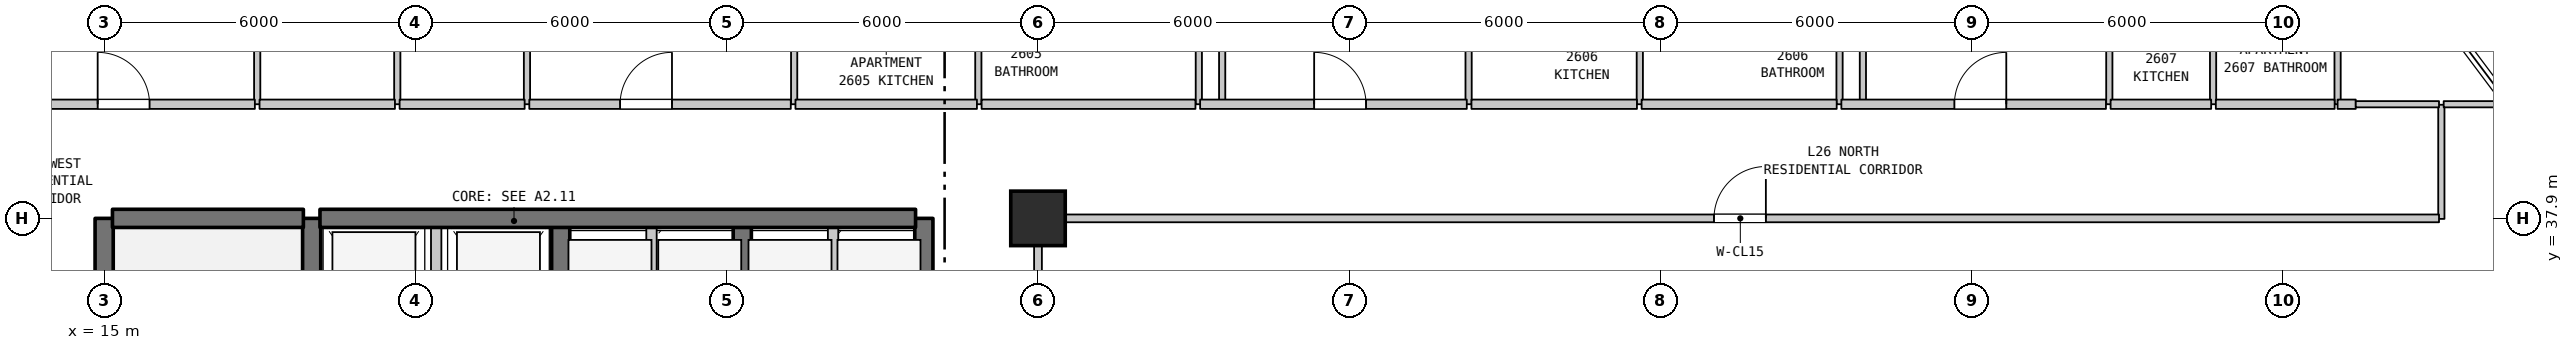
"""IFC4 building model, lengths in metres.
Left out: names, types, materials, properties, quantities, classifications, styles, units other than length and angle.
Written with IfcOpenShell. Run it as: python <this file> out.ifc"""

import sys

from ifc_helpers import new_model, si_unit, direction, frame, frame_2d, origin, origin_2d, place, context, subcontext, project, spatial, rectangle, extrude, element, fill, save


model = new_model("IFC4")
c1 = context("Model", 3, precision=1e-05, world=origin(), true_north=direction((0.0, 1.0)))
c2 = subcontext(c1, "Body", "Model", "MODEL_VIEW")
j1 = project(units=[si_unit("LENGTHUNIT", "METRE"), si_unit("PLANEANGLEUNIT", "RADIAN")], contexts=[c1])
p1 = place(None, origin())
s1 = spatial("IfcSite", under=j1, at=p1, CompositionType="ELEMENT")
p2 = place(p1, origin())
s2 = spatial("IfcBuilding", under=s1, at=p2, CompositionType="ELEMENT")
p3 = place(p2, frame((0.0, 0.0, 109.4)))
s3 = spatial("IfcBuildingStorey", under=s2, at=p3, CompositionType="ELEMENT", Elevation=109.4)
p4 = place(p3, frame((33.0, 37.9, 0.0), z_axis=(0.0, 0.0, 1.0), x_axis=(1.0, 0.0, 0.0)))
e1 = element("IfcColumn", 1, at=p4, inside=s3, PredefinedType="COLUMN", context=c2, shape_type="SweptSolid", body=[
    extrude(rectangle(XDim=1.05, YDim=1.05, at=origin_2d()), origin(), (0.0, 0.0, 1.0), 3.7),
])
p5 = place(p3, frame((15.0, 31.1, 0.0), z_axis=(0.0, 0.0, 1.0), x_axis=(0.0, 1.0, 0.0)))
e2 = element("IfcWall", 2, at=p5, inside=s3, PredefinedType="SHEAR", context=c2, shape_type="SweptSolid", body=[
    extrude(rectangle(XDim=6.8, YDim=0.35, at=frame_2d((3.4, 0.0))), origin(), (0.0, 0.0, 1.0), 3.385),
])
p6 = place(p3, frame((17.95, 40.1, 0.0), z_axis=(0.0, 0.0, 1.0), x_axis=(0.0, 1.0, 0.0)))
e3 = element("IfcWall", 3, at=p6, inside=s3, PredefinedType="PARTITIONING", context=c2, shape_type="SweptSolid", body=[
    extrude(rectangle(XDim=3.2, YDim=0.12, at=frame_2d((1.6, 0.0))), origin(), (0.0, 0.0, 1.0), 3.385),
])
p7 = place(p3, frame((19.0, 35.0, 0.0), z_axis=(0.0, 0.0, 1.0), x_axis=(0.0, 1.0, 0.0)))
e4 = element("IfcWall", 4, at=p7, inside=s3, PredefinedType="SHEAR", context=c2, shape_type="SweptSolid", body=[
    extrude(rectangle(XDim=2.9, YDim=0.35, at=frame_2d((1.45, 0.0))), origin(), (0.0, 0.0, 1.0), 3.385),
])
p8 = place(p3, frame((20.65, 40.1, 0.0), z_axis=(0.0, 0.0, 1.0), x_axis=(0.0, 1.0, 0.0)))
e5 = element("IfcWall", 5, at=p8, inside=s3, PredefinedType="PARTITIONING", context=c2, shape_type="SweptSolid", body=[
    extrude(rectangle(XDim=3.2, YDim=0.12, at=frame_2d((1.6, 0.0))), origin(), (0.0, 0.0, 1.0), 3.385),
])
p9 = place(p8, frame((1.15, 0.0, 0.0)))
e6 = element("IfcOpeningElement", 6, at=p9, cuts=e5, PredefinedType="OPENING", context=c2, shape_type="SweptSolid", body=[
    extrude(rectangle(XDim=0.9, YDim=2.15, at=frame_2d((0.45, 1.075))), frame((0.0, 0.07, 0.0), z_axis=(0.0, -1.0, 0.0), x_axis=(1.0, 0.0, 0.0)), (0.0, 0.0, 1.0), 0.14),
])
p10 = place(p3, frame((21.4, 35.0, 0.0), z_axis=(0.0, 0.0, 1.0), x_axis=(0.0, 1.0, 0.0)))
e7 = element("IfcWall", 7, at=p10, inside=s3, PredefinedType="STANDARD", context=c2, shape_type="SweptSolid", body=[
    extrude(rectangle(XDim=2.9, YDim=0.2, at=frame_2d((1.45, 0.0))), origin(), (0.0, 0.0, 1.0), 3.385),
])
p11 = place(p3, frame((23.15, 40.1, 0.0), z_axis=(0.0, 0.0, 1.0), x_axis=(0.0, 1.0, 0.0)))
e8 = element("IfcWall", 8, at=p11, inside=s3, PredefinedType="PARTITIONING", context=c2, shape_type="SweptSolid", body=[
    extrude(rectangle(XDim=2.05, YDim=0.12, at=frame_2d((1.025, 0.0))), origin(), (0.0, 0.0, 1.0), 3.385),
])
p12 = place(p3, frame((23.8, 35.0, 0.0), z_axis=(0.0, 0.0, 1.0), x_axis=(0.0, 1.0, 0.0)))
e9 = element("IfcWall", 9, at=p12, inside=s3, PredefinedType="SHEAR", context=c2, shape_type="SweptSolid", body=[
    extrude(rectangle(XDim=2.9, YDim=0.35, at=frame_2d((1.45, 0.0))), origin(), (0.0, 0.0, 1.0), 3.385),
])
p13 = place(p3, frame((25.55, 35.0, 0.0), z_axis=(0.0, 0.0, 1.0), x_axis=(0.0, 1.0, 0.0)))
e10 = element("IfcWall", 10, at=p13, inside=s3, PredefinedType="STANDARD", context=c2, shape_type="SweptSolid", body=[
    extrude(rectangle(XDim=2.9, YDim=0.2, at=frame_2d((1.45, 0.0))), origin(), (0.0, 0.0, 1.0), 3.385),
])
p14 = place(p3, frame((27.3, 35.0, 0.0), z_axis=(0.0, 0.0, 1.0), x_axis=(0.0, 1.0, 0.0)))
e11 = element("IfcWall", 11, at=p14, inside=s3, PredefinedType="SHEAR", context=c2, shape_type="SweptSolid", body=[
    extrude(rectangle(XDim=2.9, YDim=0.35, at=frame_2d((1.45, 0.0))), origin(), (0.0, 0.0, 1.0), 3.385),
])
p15 = place(p3, frame((28.3, 40.1, 0.0), z_axis=(0.0, 0.0, 1.0), x_axis=(0.0, 1.0, 0.0)))
e12 = element("IfcWall", 12, at=p15, inside=s3, PredefinedType="PARTITIONING", context=c2, shape_type="SweptSolid", body=[
    extrude(rectangle(XDim=2.3, YDim=0.12, at=frame_2d((1.15, 0.0))), origin(), (0.0, 0.0, 1.0), 3.385),
])
p16 = place(p3, frame((29.05, 35.0, 0.0), z_axis=(0.0, 0.0, 1.0), x_axis=(0.0, 1.0, 0.0)))
e13 = element("IfcWall", 13, at=p16, inside=s3, PredefinedType="STANDARD", context=c2, shape_type="SweptSolid", body=[
    extrude(rectangle(XDim=2.9, YDim=0.2, at=frame_2d((1.45, 0.0))), origin(), (0.0, 0.0, 1.0), 3.385),
])
p17 = place(p3, frame((30.8, 35.0, 0.0), z_axis=(0.0, 0.0, 1.0), x_axis=(0.0, 1.0, 0.0)))
e14 = element("IfcWall", 14, at=p17, inside=s3, PredefinedType="SHEAR", context=c2, shape_type="SweptSolid", body=[
    extrude(rectangle(XDim=2.9, YDim=0.35, at=frame_2d((1.45, 0.0))), origin(), (0.0, 0.0, 1.0), 3.385),
])
p18 = place(p3, frame((31.85, 40.1, 0.0), z_axis=(0.0, 0.0, 1.0), x_axis=(0.0, 1.0, 0.0)))
e15 = element("IfcWall", 15, at=p18, inside=s3, PredefinedType="PARTITIONING", context=c2, shape_type="SweptSolid", body=[
    extrude(rectangle(XDim=2.3, YDim=0.12, at=frame_2d((1.15, 0.0))), origin(), (0.0, 0.0, 1.0), 3.385),
])
p19 = place(p3, frame((33.0, 27.91, 0.0), z_axis=(0.0, 0.0, 1.0), x_axis=(0.0, 1.0, 0.0)))
e16 = element("IfcWall", 16, at=p19, inside=s3, PredefinedType="STANDARD", context=c2, shape_type="SweptSolid", body=[
    extrude(rectangle(XDim=9.98, YDim=0.15, at=frame_2d((4.99, 0.0))), origin(), (0.0, 0.0, 1.0), 2.885),
])
p20 = place(p3, frame((36.1, 40.1, 0.0), z_axis=(0.0, 0.0, 1.0), x_axis=(0.0, 1.0, 0.0)))
e17 = element("IfcWall", 17, at=p20, inside=s3, PredefinedType="PARTITIONING", context=c2, shape_type="SweptSolid", body=[
    extrude(rectangle(XDim=2.3, YDim=0.12, at=frame_2d((1.15, 0.0))), origin(), (0.0, 0.0, 1.0), 3.385),
])
p21 = place(p3, frame((36.55, 40.1, 0.0), z_axis=(0.0, 0.0, 1.0), x_axis=(0.0, 1.0, 0.0)))
e18 = element("IfcWall", 18, at=p21, inside=s3, PredefinedType="PARTITIONING", context=c2, shape_type="SweptSolid", body=[
    extrude(rectangle(XDim=13.79, YDim=0.12, at=frame_2d((6.895, 0.0))), origin(), (0.0, 0.0, 1.0), 3.385),
])
for number, where, z_axis, x_axis in (
    (19, (41.3, 40.1, 0.0), (0.0, 0.0, 1.0), (0.0, 1.0, 0.0)),
    (20, (44.6, 40.1, 0.0), (0.0, 0.0, 1.0), (0.0, 1.0, 0.0)),
    (21, (48.45, 40.1, 0.0), (0.0, 0.0, 1.0), (0.0, 1.0, 0.0)),
):
    element("IfcWall", number, at=place(p3, frame(where, z_axis=z_axis, x_axis=x_axis)), inside=s3, PredefinedType="PARTITIONING", context=c2, shape_type="SweptSolid", body=[
        extrude(rectangle(XDim=2.3, YDim=0.12, at=frame_2d((1.15, 0.0))), origin(), (0.0, 0.0, 1.0), 3.385),
    ])
p22 = place(p3, frame((48.9, 40.1, 0.0), z_axis=(0.0, 0.0, 1.0), x_axis=(0.0, 1.0, 0.0)))
e22 = element("IfcWall", 22, at=p22, inside=s3, PredefinedType="PARTITIONING", context=c2, shape_type="SweptSolid", body=[
    extrude(rectangle(XDim=13.79, YDim=0.12, at=frame_2d((6.895, 0.0))), origin(), (0.0, 0.0, 1.0), 3.385),
])
for number, where, z_axis, x_axis in (
    (23, (53.65, 40.1, 0.0), (0.0, 0.0, 1.0), (0.0, 1.0, 0.0)),
    (24, (55.65, 40.1, 0.0), (0.0, 0.0, 1.0), (0.0, 1.0, 0.0)),
    (25, (58.05, 40.1, 0.0), (0.0, 0.0, 1.0), (0.0, 1.0, 0.0)),
):
    element("IfcWall", number, at=place(p3, frame(where, z_axis=z_axis, x_axis=x_axis)), inside=s3, PredefinedType="PARTITIONING", context=c2, shape_type="SweptSolid", body=[
        extrude(rectangle(XDim=2.3, YDim=0.12, at=frame_2d((1.15, 0.0))), origin(), (0.0, 0.0, 1.0), 3.385),
    ])
p23 = place(p3, frame((60.05, 37.89, 0.0), z_axis=(0.0, 0.0, 1.0), x_axis=(0.0, 1.0, 0.0)))
e26 = element("IfcWall", 26, at=p23, inside=s3, PredefinedType="PARTITIONING", context=c2, shape_type="SweptSolid", body=[
    extrude(rectangle(XDim=2.2, YDim=0.12, at=frame_2d((1.1, 0.0))), origin(), (0.0, 0.0, 1.0), 3.385),
])
p24 = place(p3, frame((15.16, 37.9, 0.0), z_axis=(0.0, 0.0, 1.0), x_axis=(1.0, 0.0, 0.0)))
e27 = element("IfcWall", 27, at=p24, inside=s3, PredefinedType="SHEAR", context=c2, shape_type="SweptSolid", body=[
    extrude(rectangle(XDim=3.68, YDim=0.35, at=frame_2d((1.84, 0.0))), origin(), (0.0, 0.0, 1.0), 3.385),
])
p25 = place(p3, frame((19.16, 37.9, 0.0), z_axis=(0.0, 0.0, 1.0), x_axis=(1.0, 0.0, 0.0)))
e28 = element("IfcWall", 28, at=p25, inside=s3, PredefinedType="SHEAR", context=c2, shape_type="SweptSolid", body=[
    extrude(rectangle(XDim=11.48, YDim=0.35, at=frame_2d((5.74, 0.0))), origin(), (0.0, 0.0, 1.0), 3.385),
])
p26 = place(p3, frame((33.07, 37.9, 0.0), z_axis=(0.0, 0.0, 1.0), x_axis=(1.0, 0.0, 0.0)))
e29 = element("IfcWall", 29, at=p26, inside=s3, PredefinedType="STANDARD", context=c2, shape_type="SweptSolid", body=[
    extrude(rectangle(XDim=26.935, YDim=0.15, at=frame_2d((13.467, 0.0))), origin(), (0.0, 0.0, 1.0), 3.385),
])
p27 = place(p26, frame((12.96, 0.0, 0.0)))
e30 = element("IfcOpeningElement", 30, at=p27, cuts=e29, PredefinedType="OPENING", context=c2, shape_type="SweptSolid", body=[
    extrude(rectangle(XDim=1.0, YDim=2.15, at=frame_2d((0.5, 1.075))), frame((0.0, 0.085, 0.0), z_axis=(0.0, -1.0, 0.0), x_axis=(1.0, 0.0, 0.0)), (0.0, 0.0, 1.0), 0.17),
])
p28 = place(p3, frame((12.875, 40.1, 0.0), z_axis=(0.0, 0.0, 1.0), x_axis=(1.0, 0.0, 0.0)))
e31 = element("IfcWall", 31, at=p28, inside=s3, PredefinedType="STANDARD", context=c2, shape_type="SweptSolid", body=[
    extrude(rectangle(XDim=5.03, YDim=0.18, at=frame_2d((2.515, 0.0))), origin(), (0.0, 0.0, 1.0), 3.385),
])
p29 = place(p28, frame((2.0, 0.0, 0.0)))
e32 = element("IfcOpeningElement", 32, at=p29, cuts=e31, PredefinedType="OPENING", context=c2, shape_type="SweptSolid", body=[
    extrude(rectangle(XDim=1.0, YDim=2.15, at=frame_2d((0.5, 1.075))), frame((0.0, 0.1, 0.0), z_axis=(0.0, -1.0, 0.0), x_axis=(1.0, 0.0, 0.0)), (0.0, 0.0, 1.0), 0.2),
])
p30 = place(p3, frame((17.995, 40.1, 0.0), z_axis=(0.0, 0.0, 1.0), x_axis=(1.0, 0.0, 0.0)))
e33 = element("IfcWall", 33, at=p30, inside=s3, PredefinedType="STANDARD", context=c2, shape_type="SweptSolid", body=[
    extrude(rectangle(XDim=2.61, YDim=0.18, at=frame_2d((1.305, 0.0))), origin(), (0.0, 0.0, 1.0), 3.385),
])
p31 = place(p3, frame((20.695, 40.1, 0.0), z_axis=(0.0, 0.0, 1.0), x_axis=(1.0, 0.0, 0.0)))
e34 = element("IfcWall", 34, at=p31, inside=s3, PredefinedType="STANDARD", context=c2, shape_type="SweptSolid", body=[
    extrude(rectangle(XDim=2.41, YDim=0.18, at=frame_2d((1.205, 0.0))), origin(), (0.0, 0.0, 1.0), 3.385),
])
p32 = place(p3, frame((23.195, 40.1, 0.0), z_axis=(0.0, 0.0, 1.0), x_axis=(1.0, 0.0, 0.0)))
e35 = element("IfcWall", 35, at=p32, inside=s3, PredefinedType="STANDARD", context=c2, shape_type="SweptSolid", body=[
    extrude(rectangle(XDim=5.04, YDim=0.18, at=frame_2d((2.52, 0.0))), origin(), (0.0, 0.0, 1.0), 3.385),
])
p33 = place(p32, frame((1.75, 0.0, 0.0)))
e36 = element("IfcOpeningElement", 36, at=p33, cuts=e35, PredefinedType="OPENING", context=c2, shape_type="SweptSolid", body=[
    extrude(rectangle(XDim=1.0, YDim=2.15, at=frame_2d((0.5, 1.075))), frame((0.0, 0.1, 0.0), z_axis=(0.0, -1.0, 0.0), x_axis=(1.0, 0.0, 0.0)), (0.0, 0.0, 1.0), 0.2),
])
p34 = place(p3, frame((28.325, 40.1, 0.0), z_axis=(0.0, 0.0, 1.0), x_axis=(1.0, 0.0, 0.0)))
e37 = element("IfcWall", 37, at=p34, inside=s3, PredefinedType="STANDARD", context=c2, shape_type="SweptSolid", body=[
    extrude(rectangle(XDim=3.498, YDim=0.18, at=frame_2d((1.749, 0.0))), origin(), (0.0, 0.0, 1.0), 3.385),
])
p35 = place(p3, frame((31.913, 40.1, 0.0), z_axis=(0.0, 0.0, 1.0), x_axis=(1.0, 0.0, 0.0)))
e38 = element("IfcWall", 38, at=p35, inside=s3, PredefinedType="STANDARD", context=c2, shape_type="SweptSolid", body=[
    extrude(rectangle(XDim=4.122, YDim=0.18, at=frame_2d((2.061, 0.0))), origin(), (0.0, 0.0, 1.0), 3.385),
])
p36 = place(p3, frame((36.125, 40.1, 0.0), z_axis=(0.0, 0.0, 1.0), x_axis=(1.0, 0.0, 0.0)))
e39 = element("IfcWall", 39, at=p36, inside=s3, PredefinedType="STANDARD", context=c2, shape_type="SweptSolid", body=[
    extrude(rectangle(XDim=5.14, YDim=0.18, at=frame_2d((2.57, 0.0))), origin(), (0.0, 0.0, 1.0), 3.385),
])
p37 = place(p36, frame((2.198, 0.0, 0.0)))
e40 = element("IfcOpeningElement", 40, at=p37, cuts=e39, PredefinedType="OPENING", context=c2, shape_type="SweptSolid", body=[
    extrude(rectangle(XDim=1.0, YDim=2.15, at=frame_2d((0.5, 1.075))), frame((0.0, 0.1, 0.0), z_axis=(0.0, -1.0, 0.0), x_axis=(1.0, 0.0, 0.0)), (0.0, 0.0, 1.0), 0.2),
])
p38 = place(p3, frame((41.355, 40.1, 0.0), z_axis=(0.0, 0.0, 1.0), x_axis=(1.0, 0.0, 0.0)))
e41 = element("IfcWall", 41, at=p38, inside=s3, PredefinedType="STANDARD", context=c2, shape_type="SweptSolid", body=[
    extrude(rectangle(XDim=3.19, YDim=0.18, at=frame_2d((1.595, 0.0))), origin(), (0.0, 0.0, 1.0), 3.385),
])
p39 = place(p3, frame((44.635, 40.1, 0.0), z_axis=(0.0, 0.0, 1.0), x_axis=(1.0, 0.0, 0.0)))
e42 = element("IfcWall", 42, at=p39, inside=s3, PredefinedType="STANDARD", context=c2, shape_type="SweptSolid", body=[
    extrude(rectangle(XDim=3.76, YDim=0.18, at=frame_2d((1.88, 0.0))), origin(), (0.0, 0.0, 1.0), 3.385),
])
p40 = place(p3, frame((48.485, 40.1, 0.0), z_axis=(0.0, 0.0, 1.0), x_axis=(1.0, 0.0, 0.0)))
e43 = element("IfcWall", 43, at=p40, inside=s3, PredefinedType="STANDARD", context=c2, shape_type="SweptSolid", body=[
    extrude(rectangle(XDim=5.1, YDim=0.18, at=frame_2d((2.55, 0.0))), origin(), (0.0, 0.0, 1.0), 3.385),
])
p41 = place(p40, frame((2.179, 0.0, 0.0)))
e44 = element("IfcOpeningElement", 44, at=p41, cuts=e43, PredefinedType="OPENING", context=c2, shape_type="SweptSolid", body=[
    extrude(rectangle(XDim=1.0, YDim=2.15, at=frame_2d((0.5, 1.075))), frame((0.0, 0.1, 0.0), z_axis=(0.0, -1.0, 0.0), x_axis=(1.0, 0.0, 0.0)), (0.0, 0.0, 1.0), 0.2),
])
p42 = place(p3, frame((53.675, 40.1, 0.0), z_axis=(0.0, 0.0, 1.0), x_axis=(1.0, 0.0, 0.0)))
e45 = element("IfcWall", 45, at=p42, inside=s3, PredefinedType="STANDARD", context=c2, shape_type="SweptSolid", body=[
    extrude(rectangle(XDim=1.938, YDim=0.18, at=frame_2d((0.969, 0.0))), origin(), (0.0, 0.0, 1.0), 3.385),
])
p43 = place(p3, frame((55.703, 40.1, 0.0), z_axis=(0.0, 0.0, 1.0), x_axis=(1.0, 0.0, 0.0)))
e46 = element("IfcWall", 46, at=p43, inside=s3, PredefinedType="STANDARD", context=c2, shape_type="SweptSolid", body=[
    extrude(rectangle(XDim=2.29, YDim=0.18, at=frame_2d((1.145, 0.0))), origin(), (0.0, 0.0, 1.0), 3.385),
])
p44 = place(p3, frame((58.05, 40.1, 0.0), z_axis=(0.0, 0.0, 1.0), x_axis=(1.0, 0.0, 0.0)))
e47 = element("IfcWall", 47, at=p44, inside=s3, PredefinedType="STANDARD", context=c2, shape_type="SweptSolid", body=[
    extrude(rectangle(XDim=0.35, YDim=0.18, at=frame_2d((0.175, 0.0))), origin(), (0.0, 0.0, 1.0), 3.385),
])
p45 = place(p3, frame((58.4, 40.1, 0.0), z_axis=(0.0, 0.0, 1.0), x_axis=(1.0, 0.0, 0.0)))
e48 = element("IfcWall", 48, at=p45, inside=s3, PredefinedType="PARTITIONING", context=c2, shape_type="SweptSolid", body=[
    extrude(rectangle(XDim=1.605, YDim=0.12, at=frame_2d((0.802, 0.0))), origin(), (0.0, 0.0, 1.0), 3.385),
])
p46 = place(p3, frame((60.095, 40.1, 0.0), z_axis=(0.0, 0.0, 1.0), x_axis=(1.0, 0.0, 0.0)))
e49 = element("IfcWall", 49, at=p46, inside=s3, PredefinedType="PARTITIONING", context=c2, shape_type="SweptSolid", body=[
    extrude(rectangle(XDim=1.245, YDim=0.12, at=frame_2d((0.623, 0.0))), origin(), (0.0, 0.0, 1.0), 3.385),
])
p47 = place(p27, origin())
e50 = element("IfcDoor", 50, at=p47, inside=s3, OperationType="SINGLE_SWING_RIGHT", PredefinedType="DOOR", context=c2, shape_type="SweptSolid", body=[
    extrude(rectangle(XDim=1.0, YDim=2.15, at=frame_2d((0.5, 1.075))), frame((0.0, 0.025, 0.0), z_axis=(0.0, -1.0, 0.0), x_axis=(1.0, 0.0, 0.0)), (0.0, 0.0, 1.0), 0.05),
])
fill(e30, e50)
p48 = place(p29, origin())
e51 = element("IfcDoor", 51, at=p48, inside=s3, OperationType="SINGLE_SWING_LEFT", PredefinedType="DOOR", context=c2, shape_type="SweptSolid", body=[
    extrude(rectangle(XDim=1.0, YDim=2.15, at=frame_2d((0.5, 1.075))), frame((0.0, 0.025, 0.0), z_axis=(0.0, -1.0, 0.0), x_axis=(1.0, 0.0, 0.0)), (0.0, 0.0, 1.0), 0.05),
])
fill(e32, e51)
p49 = place(p33, origin())
e52 = element("IfcDoor", 52, at=p49, inside=s3, OperationType="SINGLE_SWING_RIGHT", PredefinedType="DOOR", context=c2, shape_type="SweptSolid", body=[
    extrude(rectangle(XDim=1.0, YDim=2.15, at=frame_2d((0.5, 1.075))), frame((0.0, 0.025, 0.0), z_axis=(0.0, -1.0, 0.0), x_axis=(1.0, 0.0, 0.0)), (0.0, 0.0, 1.0), 0.05),
])
fill(e36, e52)
p50 = place(p37, origin())
e53 = element("IfcDoor", 53, at=p50, inside=s3, OperationType="SINGLE_SWING_LEFT", PredefinedType="DOOR", context=c2, shape_type="SweptSolid", body=[
    extrude(rectangle(XDim=1.0, YDim=2.15, at=frame_2d((0.5, 1.075))), frame((0.0, 0.025, 0.0), z_axis=(0.0, -1.0, 0.0), x_axis=(1.0, 0.0, 0.0)), (0.0, 0.0, 1.0), 0.05),
])
fill(e40, e53)
p51 = place(p41, origin())
e54 = element("IfcDoor", 54, at=p51, inside=s3, OperationType="SINGLE_SWING_RIGHT", PredefinedType="DOOR", context=c2, shape_type="SweptSolid", body=[
    extrude(rectangle(XDim=1.0, YDim=2.15, at=frame_2d((0.5, 1.075))), frame((0.0, 0.025, 0.0), z_axis=(0.0, -1.0, 0.0), x_axis=(1.0, 0.0, 0.0)), (0.0, 0.0, 1.0), 0.05),
])
fill(e44, e54)
save(model, sys.argv[1])
